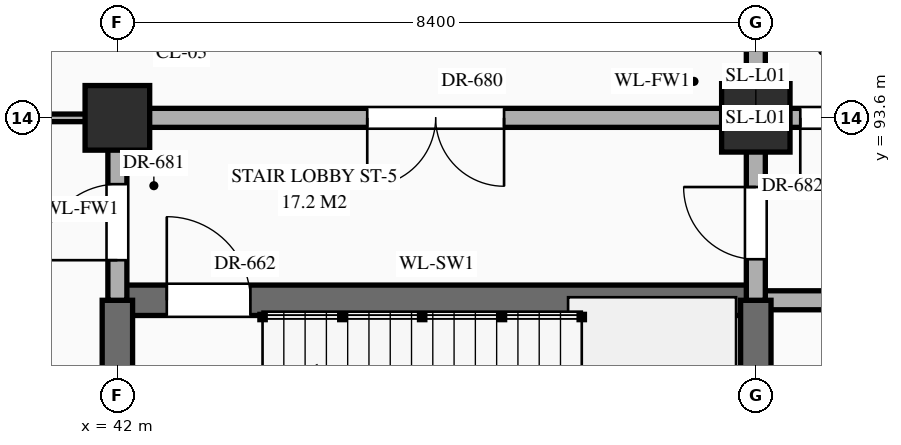
"""IFC4 building model, lengths in metres.
Left out: names, types, materials, properties, quantities, classifications, styles, units other than length and angle.
Written with IfcOpenShell. Run it as: python <this file> out.ifc"""

import sys

from ifc_helpers import new_model, si_unit, direction, frame, frame_2d, origin, origin_2d, place, context, subcontext, project, spatial, rectangle, extrude, element, fill, save


model = new_model("IFC4")
c1 = context("Model", 3, precision=1e-05, world=origin(), true_north=direction((0.0, 1.0)))
c2 = subcontext(c1, "Body", "Model", "MODEL_VIEW")
j1 = project(units=[si_unit("LENGTHUNIT", "METRE"), si_unit("PLANEANGLEUNIT", "RADIAN")], contexts=[c1])
p1 = place(None, origin())
s1 = spatial("IfcSite", under=j1, at=p1, CompositionType="ELEMENT")
p2 = place(p1, origin())
s2 = spatial("IfcBuilding", under=s1, at=p2, CompositionType="ELEMENT")
p3 = place(p2, origin())
s3 = spatial("IfcBuildingStorey", under=s2, at=p3, CompositionType="ELEMENT", Elevation=0.0)
p4 = place(p3, frame((42.0, 93.6, 0.0), z_axis=(0.0, 0.0, 1.0), x_axis=(1.0, 0.0, 0.0)))
e1 = element("IfcColumn", 1, at=p4, inside=s3, PredefinedType="COLUMN", context=c2, shape_type="SweptSolid", body=[
    extrude(rectangle(XDim=0.85, YDim=0.85, at=origin_2d()), origin(), (0.0, 0.0, 1.0), 5.4),
])
p5 = place(p3, frame((50.4, 93.6, 0.0), z_axis=(0.0, 0.0, 1.0), x_axis=(1.0, 0.0, 0.0)))
e2 = element("IfcColumn", 2, at=p5, inside=s3, PredefinedType="COLUMN", context=c2, shape_type="SweptSolid", body=[
    extrude(rectangle(XDim=0.9, YDim=0.9, at=origin_2d()), origin(), (0.0, 0.0, 1.0), 5.4),
])
p6 = place(p3, frame((42.0, 91.2, 0.0), z_axis=(0.0, 0.0, 1.0), x_axis=(1.0, 0.0, 0.0)))
e3 = element("IfcWall", 3, at=p6, inside=s3, PredefinedType="SHEAR", context=c2, shape_type="SweptSolid", body=[
    extrude(rectangle(XDim=8.4, YDim=0.4, at=frame_2d((4.2, 0.0))), origin(), (0.0, 0.0, 1.0), 5.12),
])
p7 = place(p6, frame((0.65, 0.0, 0.0)))
e4 = element("IfcOpeningElement", 4, at=p7, cuts=e3, PredefinedType="OPENING", context=c2, shape_type="SweptSolid", body=[
    extrude(rectangle(XDim=1.1, YDim=2.2, at=frame_2d((0.55, 1.1))), frame((0.0, 0.212, 0.0), z_axis=(0.0, -1.0, 0.0), x_axis=(1.0, 0.0, 0.0)), (0.0, 0.0, 1.0), 0.424),
])
p8 = place(p3, frame((50.4, 91.2, 0.0), z_axis=(0.0, 0.0, 1.0), x_axis=(1.0, 0.0, 0.0)))
e5 = element("IfcWall", 5, at=p8, inside=s3, PredefinedType="STANDARD", context=c2, shape_type="SweptSolid", body=[
    extrude(rectangle(XDim=2.8, YDim=0.25, at=frame_2d((1.4, 0.0))), origin(), (0.0, 0.0, 1.0), 5.12),
])
p9 = place(p3, frame((30.8, 93.6, 0.0), z_axis=(0.0, 0.0, 1.0), x_axis=(1.0, 0.0, 0.0)))
e6 = element("IfcWall", 6, at=p9, inside=s3, PredefinedType="STANDARD", context=c2, shape_type="SweptSolid", body=[
    extrude(rectangle(XDim=11.2, YDim=0.1, at=frame_2d((5.6, 0.0))), origin(), (0.0, 0.0, 1.0), 4.27),
])
p10 = place(p9, frame((0.728, 0.0, 0.0)))
e7 = element("IfcOpeningElement", 7, at=p10, cuts=e6, PredefinedType="OPENING", context=c2, shape_type="SweptSolid", body=[
    extrude(rectangle(XDim=1.0, YDim=2.25, at=frame_2d((0.5, 1.125))), frame((0.0, 0.062, 0.0), z_axis=(0.0, -1.0, 0.0), x_axis=(1.0, 0.0, 0.0)), (0.0, 0.0, 1.0), 0.124),
])
p11 = place(p9, frame((6.48, 0.0, 0.0)))
e8 = element("IfcOpeningElement", 8, at=p11, cuts=e6, PredefinedType="OPENING", context=c2, shape_type="SweptSolid", body=[
    extrude(rectangle(XDim=1.04, YDim=2.2, at=frame_2d((0.52, 1.1))), frame((0.0, 0.062, 0.0), z_axis=(0.0, -1.0, 0.0), x_axis=(1.0, 0.0, 0.0)), (0.0, 0.0, 1.0), 0.124),
])
p12 = place(p3, frame((42.0, 93.6, 0.0), z_axis=(0.0, 0.0, 1.0), x_axis=(1.0, 0.0, 0.0)))
e9 = element("IfcWall", 9, at=p12, inside=s3, PredefinedType="STANDARD", context=c2, shape_type="SweptSolid", body=[
    extrude(rectangle(XDim=25.2, YDim=0.25, at=frame_2d((12.6, 0.0))), origin(), (0.0, 0.0, 1.0), 4.27),
])
p13 = place(p12, frame((20.2, 0.0, 0.0)))
e10 = element("IfcOpeningElement", 10, at=p13, cuts=e9, PredefinedType="OPENING", context=c2, shape_type="SweptSolid", body=[
    extrude(rectangle(XDim=1.6, YDim=2.3, at=frame_2d((0.8, 1.15))), frame((0.0, 0.137, 0.0), z_axis=(0.0, -1.0, 0.0), x_axis=(1.0, 0.0, 0.0)), (0.0, 0.0, 1.0), 0.274),
])
p14 = place(p12, frame((3.288, 0.0, 0.0)))
e11 = element("IfcOpeningElement", 11, at=p14, cuts=e9, PredefinedType="OPENING", context=c2, shape_type="SweptSolid", body=[
    extrude(rectangle(XDim=1.8, YDim=2.35, at=frame_2d((0.9, 1.175))), frame((0.0, 0.137, 0.0), z_axis=(0.0, -1.0, 0.0), x_axis=(1.0, 0.0, 0.0)), (0.0, 0.0, 1.0), 0.274),
])
p15 = place(p12, frame((8.985, 0.0, 0.0)))
e12 = element("IfcOpeningElement", 12, at=p15, cuts=e9, PredefinedType="OPENING", context=c2, shape_type="SweptSolid", body=[
    extrude(rectangle(XDim=2.0, YDim=2.4, at=frame_2d((1.0, 1.2))), frame((0.0, 0.137, 0.0), z_axis=(0.0, -1.0, 0.0), x_axis=(1.0, 0.0, 0.0)), (0.0, 0.0, 1.0), 0.274),
])
p16 = place(p12, frame((12.125, 0.0, 0.0)))
e13 = element("IfcOpeningElement", 13, at=p16, cuts=e9, PredefinedType="OPENING", context=c2, shape_type="SweptSolid", body=[
    extrude(rectangle(XDim=0.95, YDim=2.15, at=frame_2d((0.475, 1.075))), frame((0.0, 0.137, 0.0), z_axis=(0.0, -1.0, 0.0), x_axis=(1.0, 0.0, 0.0)), (0.0, 0.0, 1.0), 0.274),
])
p17 = place(p12, frame((14.665, 0.0, 0.0)))
e14 = element("IfcOpeningElement", 14, at=p17, cuts=e9, PredefinedType="OPENING", context=c2, shape_type="SweptSolid", body=[
    extrude(rectangle(XDim=1.1, YDim=2.2, at=frame_2d((0.55, 1.1))), frame((0.0, 0.137, 0.0), z_axis=(0.0, -1.0, 0.0), x_axis=(1.0, 0.0, 0.0)), (0.0, 0.0, 1.0), 0.274),
])
p18 = place(p3, frame((42.0, 86.4, 0.0), z_axis=(0.0, 0.0, 1.0), x_axis=(0.0, 1.0, 0.0)))
e15 = element("IfcWall", 15, at=p18, inside=s3, PredefinedType="SHEAR", context=c2, shape_type="SweptSolid", body=[
    extrude(rectangle(XDim=4.8, YDim=0.4, at=frame_2d((2.4, 0.0))), origin(), (0.0, 0.0, 1.0), 5.12),
])
p19 = place(p3, frame((42.0, 91.2, 0.0), z_axis=(0.0, 0.0, 1.0), x_axis=(0.0, 1.0, 0.0)))
e16 = element("IfcWall", 16, at=p19, inside=s3, PredefinedType="STANDARD", context=c2, shape_type="SweptSolid", body=[
    extrude(rectangle(XDim=2.4, YDim=0.25, at=frame_2d((1.2, 0.0))), origin(), (0.0, 0.0, 1.0), 4.37),
])
p20 = place(p19, frame((0.528, 0.0, 0.0)))
e17 = element("IfcOpeningElement", 17, at=p20, cuts=e16, PredefinedType="OPENING", context=c2, shape_type="SweptSolid", body=[
    extrude(rectangle(XDim=1.0, YDim=2.2, at=frame_2d((0.5, 1.1))), frame((0.0, 0.137, 0.0), z_axis=(0.0, -1.0, 0.0), x_axis=(1.0, 0.0, 0.0)), (0.0, 0.0, 1.0), 0.274),
])
p21 = place(p3, frame((50.4, 86.4, 0.0), z_axis=(0.0, 0.0, 1.0), x_axis=(0.0, 1.0, 0.0)))
e18 = element("IfcWall", 18, at=p21, inside=s3, PredefinedType="SHEAR", context=c2, shape_type="SweptSolid", body=[
    extrude(rectangle(XDim=4.8, YDim=0.4, at=frame_2d((2.4, 0.0))), origin(), (0.0, 0.0, 1.0), 5.12),
])
p22 = place(p3, frame((50.4, 91.2, 0.0), z_axis=(0.0, 0.0, 1.0), x_axis=(0.0, 1.0, 0.0)))
e19 = element("IfcWall", 19, at=p22, inside=s3, PredefinedType="STANDARD", context=c2, shape_type="SweptSolid", body=[
    extrude(rectangle(XDim=13.2, YDim=0.25, at=frame_2d((6.6, 0.0))), origin(), (0.0, 0.0, 1.0), 4.37),
])
p23 = place(p22, frame((0.54, 0.0, 0.0)))
e20 = element("IfcOpeningElement", 20, at=p23, cuts=e19, PredefinedType="OPENING", context=c2, shape_type="SweptSolid", body=[
    extrude(rectangle(XDim=0.95, YDim=2.15, at=frame_2d((0.475, 1.075))), frame((0.0, 0.137, 0.0), z_axis=(0.0, -1.0, 0.0), x_axis=(1.0, 0.0, 0.0)), (0.0, 0.0, 1.0), 0.274),
])
p24 = place(p22, frame((10.485, 0.0, 0.0)))
e21 = element("IfcOpeningElement", 21, at=p24, cuts=e19, PredefinedType="OPENING", context=c2, shape_type="SweptSolid", body=[
    extrude(rectangle(XDim=1.0, YDim=2.2, at=frame_2d((0.5, 1.1))), frame((0.0, 0.137, 0.0), z_axis=(0.0, -1.0, 0.0), x_axis=(1.0, 0.0, 0.0)), (0.0, 0.0, 1.0), 0.274),
])
p25 = place(p22, frame((3.31, 0.0, 0.0)))
e22 = element("IfcOpeningElement", 22, at=p25, cuts=e19, PredefinedType="OPENING", context=c2, shape_type="SweptSolid", body=[
    extrude(rectangle(XDim=0.95, YDim=2.15, at=frame_2d((0.475, 1.075))), frame((0.0, 0.137, 0.0), z_axis=(0.0, -1.0, 0.0), x_axis=(1.0, 0.0, 0.0)), (0.0, 0.0, 1.0), 0.274),
])
p26 = place(p7, origin())
e23 = element("IfcDoor", 23, at=p26, inside=s3, OperationType="SINGLE_SWING_LEFT", PredefinedType="DOOR", context=c2, shape_type="SweptSolid", body=[
    extrude(rectangle(XDim=1.1, YDim=2.2, at=frame_2d((0.55, 1.1))), frame((0.0, 0.025, 0.0), z_axis=(0.0, -1.0, 0.0), x_axis=(1.0, 0.0, 0.0)), (0.0, 0.0, 1.0), 0.05),
])
fill(e4, e23)
p27 = place(p14, frame((1.8, 0.0, 0.0), z_axis=(0.0, 0.0, 1.0), x_axis=(-1.0, 0.0, 0.0)))
e24 = element("IfcDoor", 24, at=p27, inside=s3, OperationType="DOUBLE_DOOR_SINGLE_SWING", PredefinedType="DOOR", context=c2, shape_type="SweptSolid", body=[
    extrude(rectangle(XDim=1.8, YDim=2.35, at=frame_2d((0.9, 1.175))), frame((0.0, 0.025, 0.0), z_axis=(0.0, -1.0, 0.0), x_axis=(1.0, 0.0, 0.0)), (0.0, 0.0, 1.0), 0.05),
])
fill(e11, e24)
p28 = place(p20, origin())
e25 = element("IfcDoor", 25, at=p28, inside=s3, OperationType="SINGLE_SWING_LEFT", PredefinedType="DOOR", context=c2, shape_type="SweptSolid", body=[
    extrude(rectangle(XDim=1.0, YDim=2.2, at=frame_2d((0.5, 1.1))), frame((0.0, 0.025, 0.0), z_axis=(0.0, -1.0, 0.0), x_axis=(1.0, 0.0, 0.0)), (0.0, 0.0, 1.0), 0.05),
])
fill(e17, e25)
p29 = place(p23, origin())
e26 = element("IfcDoor", 26, at=p29, inside=s3, OperationType="SINGLE_SWING_RIGHT", PredefinedType="DOOR", context=c2, shape_type="SweptSolid", body=[
    extrude(rectangle(XDim=0.95, YDim=2.15, at=frame_2d((0.475, 1.075))), frame((0.0, 0.025, 0.0), z_axis=(0.0, -1.0, 0.0), x_axis=(1.0, 0.0, 0.0)), (0.0, 0.0, 1.0), 0.05),
])
fill(e20, e26)
p30 = place(p15, frame((2.0, 0.0, 0.0), z_axis=(0.0, 0.0, 1.0), x_axis=(-1.0, 0.0, 0.0)))
e27 = element("IfcDoor", 27, at=p30, inside=s3, OperationType="DOUBLE_DOOR_SINGLE_SWING", PredefinedType="DOOR", context=c2, shape_type="SweptSolid", body=[
    extrude(rectangle(XDim=2.0, YDim=2.4, at=frame_2d((1.0, 1.2))), frame((0.0, 0.025, 0.0), z_axis=(0.0, -1.0, 0.0), x_axis=(1.0, 0.0, 0.0)), (0.0, 0.0, 1.0), 0.05),
])
fill(e12, e27)
save(model, sys.argv[1])
